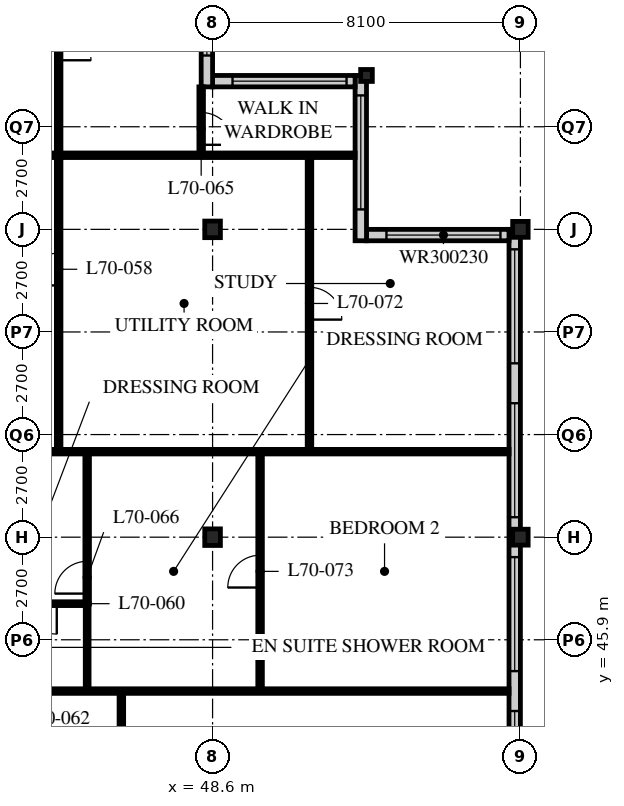
"""IFC4 building model, lengths in metres.
Left out: names, types, materials, properties, quantities, classifications, styles, units other than length and angle.
Written with IfcOpenShell. Run it as: python <this file> out.ifc"""

import sys

from ifc_helpers import new_model, si_unit, direction, frame, frame_2d, origin, origin_2d, place, context, subcontext, project, spatial, rectangle, i_section, extrude, element, fill, save


model = new_model("IFC4")
c1 = context("Model", 3, precision=1e-05, world=origin(), true_north=direction((0.0, 1.0)))
c2 = subcontext(c1, "Body", "Model", "MODEL_VIEW")
j1 = project(units=[si_unit("LENGTHUNIT", "METRE"), si_unit("PLANEANGLEUNIT", "RADIAN")], contexts=[c1])
p1 = place(None, origin())
s1 = spatial("IfcSite", under=j1, at=p1, CompositionType="ELEMENT")
p2 = place(p1, origin())
s2 = spatial("IfcBuilding", under=s1, at=p2, CompositionType="ELEMENT")
p3 = place(p2, frame((0.0, 0.0, 273.6)))
s3 = spatial("IfcBuildingStorey", under=s2, at=p3, CompositionType="ELEMENT", Elevation=273.6)
for number, where, z_axis, x_axis in (
    (1, (48.6, 48.6, 0.0), (0.0, 0.0, 1.0), (1.0, 0.0, 0.0)),
    (2, (48.6, 56.7, 0.0), (0.0, 0.0, 1.0), (1.0, 0.0, 0.0)),
):
    element("IfcColumn", number, at=place(p3, frame(where, z_axis=z_axis, x_axis=x_axis)), inside=s3, PredefinedType="COLUMN", context=c2, shape_type="SweptSolid", body=[
        extrude(i_section(OverallWidth=0.412, OverallDepth=0.437, WebThickness=0.036, FlangeThickness=0.058, FilletRadius=0.015, at=origin_2d()), origin(), (0.0, 0.0, 1.0), 3.9),
    ])
p4 = place(p3, frame((52.65, 60.75, 0.0), z_axis=(0.0, 0.0, 1.0), x_axis=(1.0, 0.0, 0.0)))
e3 = element("IfcColumn", 3, at=p4, inside=s3, PredefinedType="COLUMN", context=c2, shape_type="SweptSolid", body=[
    extrude(i_section(OverallWidth=0.307, OverallDepth=0.314, WebThickness=0.012, FlangeThickness=0.019, FilletRadius=0.015, at=origin_2d()), origin(), (0.0, 0.0, 1.0), 3.9),
])
for number, where, z_axis, x_axis in (
    (4, (56.7, 48.6, 0.0), (0.0, 0.0, 1.0), (1.0, 0.0, 0.0)),
    (5, (56.7, 56.7, 0.0), (0.0, 0.0, 1.0), (1.0, 0.0, 0.0)),
):
    element("IfcColumn", number, at=place(p3, frame(where, z_axis=z_axis, x_axis=x_axis)), inside=s3, PredefinedType="COLUMN", context=c2, shape_type="SweptSolid", body=[
        extrude(i_section(OverallWidth=0.407, OverallDepth=0.419, WebThickness=0.031, FlangeThickness=0.049, FilletRadius=0.015, at=origin_2d()), origin(), (0.0, 0.0, 1.0), 3.9),
    ])
p5 = place(p3, frame((56.55, 24.6, 0.0), z_axis=(0.0, 0.0, 1.0), x_axis=(0.0, 1.0, 0.0)))
e6 = element("IfcWall", 6, at=p5, inside=s3, PredefinedType="SOLIDWALL", context=c2, shape_type="SweptSolid", body=[
    extrude(rectangle(XDim=32.1, YDim=0.3, at=frame_2d((16.05, 0.0))), origin(), (0.0, 0.0, 1.0), 3.69),
])
p6 = place(p5, frame((0.225, 0.0, 0.6)))
e7 = element("IfcOpeningElement", 7, at=p6, cuts=e6, PredefinedType="OPENING", context=c2, shape_type="SweptSolid", body=[
    extrude(rectangle(XDim=3.0, YDim=2.4, at=frame_2d((1.5, 1.2))), frame((0.0, 0.16, 0.0), z_axis=(0.0, -1.0, 0.0), x_axis=(1.0, 0.0, 0.0)), (0.0, 0.0, 1.0), 0.32),
])
p7 = place(p5, frame((4.275, 0.0, 0.6)))
e8 = element("IfcOpeningElement", 8, at=p7, cuts=e6, PredefinedType="OPENING", context=c2, shape_type="SweptSolid", body=[
    extrude(rectangle(XDim=3.0, YDim=2.4, at=frame_2d((1.5, 1.2))), frame((0.0, 0.16, 0.0), z_axis=(0.0, -1.0, 0.0), x_axis=(1.0, 0.0, 0.0)), (0.0, 0.0, 1.0), 0.32),
])
p8 = place(p5, frame((8.325, 0.0, 0.6)))
e9 = element("IfcOpeningElement", 9, at=p8, cuts=e6, PredefinedType="OPENING", context=c2, shape_type="SweptSolid", body=[
    extrude(rectangle(XDim=3.0, YDim=2.4, at=frame_2d((1.5, 1.2))), frame((0.0, 0.16, 0.0), z_axis=(0.0, -1.0, 0.0), x_axis=(1.0, 0.0, 0.0)), (0.0, 0.0, 1.0), 0.32),
])
p9 = place(p5, frame((12.375, 0.0, 0.6)))
e10 = element("IfcOpeningElement", 10, at=p9, cuts=e6, PredefinedType="OPENING", context=c2, shape_type="SweptSolid", body=[
    extrude(rectangle(XDim=3.0, YDim=2.4, at=frame_2d((1.5, 1.2))), frame((0.0, 0.16, 0.0), z_axis=(0.0, -1.0, 0.0), x_axis=(1.0, 0.0, 0.0)), (0.0, 0.0, 1.0), 0.32),
])
p10 = place(p5, frame((16.425, 0.0, 0.6)))
e11 = element("IfcOpeningElement", 11, at=p10, cuts=e6, PredefinedType="OPENING", context=c2, shape_type="SweptSolid", body=[
    extrude(rectangle(XDim=3.0, YDim=2.4, at=frame_2d((1.5, 1.2))), frame((0.0, 0.16, 0.0), z_axis=(0.0, -1.0, 0.0), x_axis=(1.0, 0.0, 0.0)), (0.0, 0.0, 1.0), 0.32),
])
p11 = place(p5, frame((20.475, 0.0, 0.6)))
e12 = element("IfcOpeningElement", 12, at=p11, cuts=e6, PredefinedType="OPENING", context=c2, shape_type="SweptSolid", body=[
    extrude(rectangle(XDim=3.0, YDim=2.4, at=frame_2d((1.5, 1.2))), frame((0.0, 0.16, 0.0), z_axis=(0.0, -1.0, 0.0), x_axis=(1.0, 0.0, 0.0)), (0.0, 0.0, 1.0), 0.32),
])
p12 = place(p5, frame((24.525, 0.0, 0.6)))
e13 = element("IfcOpeningElement", 13, at=p12, cuts=e6, PredefinedType="OPENING", context=c2, shape_type="SweptSolid", body=[
    extrude(rectangle(XDim=3.0, YDim=2.4, at=frame_2d((1.5, 1.2))), frame((0.0, 0.16, 0.0), z_axis=(0.0, -1.0, 0.0), x_axis=(1.0, 0.0, 0.0)), (0.0, 0.0, 1.0), 0.32),
])
p13 = place(p5, frame((28.575, 0.0, 0.6)))
e14 = element("IfcOpeningElement", 14, at=p13, cuts=e6, PredefinedType="OPENING", context=c2, shape_type="SweptSolid", body=[
    extrude(rectangle(XDim=3.0, YDim=2.4, at=frame_2d((1.5, 1.2))), frame((0.0, 0.16, 0.0), z_axis=(0.0, -1.0, 0.0), x_axis=(1.0, 0.0, 0.0)), (0.0, 0.0, 1.0), 0.32),
])
p14 = place(p3, frame((56.4, 56.55, 0.0), z_axis=(0.0, 0.0, 1.0), x_axis=(-1.0, 0.0, 0.0)))
e15 = element("IfcWall", 15, at=p14, inside=s3, PredefinedType="SOLIDWALL", context=c2, shape_type="SweptSolid", body=[
    extrude(rectangle(XDim=3.75, YDim=0.3, at=frame_2d((1.875, 0.0))), origin(), (0.0, 0.0, 1.0), 3.69),
])
p15 = place(p14, frame((0.225, 0.0, 0.6)))
e16 = element("IfcOpeningElement", 16, at=p15, cuts=e15, PredefinedType="OPENING", context=c2, shape_type="SweptSolid", body=[
    extrude(rectangle(XDim=3.0, YDim=2.3, at=frame_2d((1.5, 1.15))), frame((0.0, 0.16, 0.0), z_axis=(0.0, -1.0, 0.0), x_axis=(1.0, 0.0, 0.0)), (0.0, 0.0, 1.0), 0.32),
])
p16 = place(p3, frame((52.5, 56.4, 0.0), z_axis=(0.0, 0.0, 1.0), x_axis=(0.0, 1.0, 0.0)))
e17 = element("IfcWall", 17, at=p16, inside=s3, PredefinedType="SOLIDWALL", context=c2, shape_type="SweptSolid", body=[
    extrude(rectangle(XDim=4.35, YDim=0.3, at=frame_2d((2.175, 0.0))), origin(), (0.0, 0.0, 1.0), 3.69),
])
p17 = place(p16, frame((0.825, 0.0, 0.6)))
e18 = element("IfcOpeningElement", 18, at=p17, cuts=e17, PredefinedType="OPENING", context=c2, shape_type="SweptSolid", body=[
    extrude(rectangle(XDim=3.0, YDim=2.3, at=frame_2d((1.5, 1.15))), frame((0.0, 0.16, 0.0), z_axis=(0.0, -1.0, 0.0), x_axis=(1.0, 0.0, 0.0)), (0.0, 0.0, 1.0), 0.32),
])
p18 = place(p3, frame((52.35, 60.6, 0.0), z_axis=(0.0, 0.0, 1.0), x_axis=(-1.0, 0.0, 0.0)))
e19 = element("IfcWall", 19, at=p18, inside=s3, PredefinedType="SOLIDWALL", context=c2, shape_type="SweptSolid", body=[
    extrude(rectangle(XDim=3.75, YDim=0.3, at=frame_2d((1.875, 0.0))), origin(), (0.0, 0.0, 1.0), 3.69),
])
p19 = place(p18, frame((0.225, 0.0, 0.6)))
e20 = element("IfcOpeningElement", 20, at=p19, cuts=e19, PredefinedType="OPENING", context=c2, shape_type="SweptSolid", body=[
    extrude(rectangle(XDim=3.0, YDim=2.3, at=frame_2d((1.5, 1.15))), frame((0.0, 0.16, 0.0), z_axis=(0.0, -1.0, 0.0), x_axis=(1.0, 0.0, 0.0)), (0.0, 0.0, 1.0), 0.32),
])
p20 = place(p3, frame((48.45, 60.45, 0.0), z_axis=(0.0, 0.0, 1.0), x_axis=(0.0, 1.0, 0.0)))
e21 = element("IfcWall", 21, at=p20, inside=s3, PredefinedType="SOLIDWALL", context=c2, shape_type="SweptSolid", body=[
    extrude(rectangle(XDim=4.35, YDim=0.3, at=frame_2d((2.175, 0.0))), origin(), (0.0, 0.0, 1.0), 3.69),
])
p21 = place(p20, frame((0.825, 0.0, 0.6)))
e22 = element("IfcOpeningElement", 22, at=p21, cuts=e21, PredefinedType="OPENING", context=c2, shape_type="SweptSolid", body=[
    extrude(rectangle(XDim=3.0, YDim=2.3, at=frame_2d((1.5, 1.15))), frame((0.0, 0.16, 0.0), z_axis=(0.0, -1.0, 0.0), x_axis=(1.0, 0.0, 0.0)), (0.0, 0.0, 1.0), 0.32),
])
p22 = place(p3, frame((42.9, 50.85, 0.0), z_axis=(0.0, 0.0, 1.0), x_axis=(1.0, 0.0, 0.0)))
e23 = element("IfcWall", 23, at=p22, inside=s3, PredefinedType="PARTITIONING", context=c2, shape_type="SweptSolid", body=[
    extrude(rectangle(XDim=13.5, YDim=0.12, at=frame_2d((6.75, 0.0))), origin(), (0.0, 0.0, 1.0), 3.69),
])
p23 = place(p3, frame((36.45, 58.65, 0.0), z_axis=(0.0, 0.0, 1.0), x_axis=(1.0, 0.0, 0.0)))
e24 = element("IfcWall", 24, at=p23, inside=s3, PredefinedType="PARTITIONING", context=c2, shape_type="SweptSolid", body=[
    extrude(rectangle(XDim=15.9, YDim=0.12, at=frame_2d((7.95, 0.0))), origin(), (0.0, 0.0, 1.0), 3.69),
])
p24 = place(p23, frame((1.675, 0.0, 0.0)))
e25 = element("IfcOpeningElement", 25, at=p24, cuts=e24, PredefinedType="OPENING", context=c2, shape_type="SweptSolid", body=[
    extrude(rectangle(XDim=0.85, YDim=2.1, at=frame_2d((0.425, 1.05))), frame((0.0, 0.07, 0.0), z_axis=(0.0, -1.0, 0.0), x_axis=(1.0, 0.0, 0.0)), (0.0, 0.0, 1.0), 0.14),
])
p25 = place(p3, frame((44.55, 64.5, 0.0), z_axis=(0.0, 0.0, 1.0), x_axis=(0.0, -1.0, 0.0)))
e26 = element("IfcWall", 26, at=p25, inside=s3, PredefinedType="PARTITIONING", context=c2, shape_type="SweptSolid", body=[
    extrude(rectangle(XDim=13.65, YDim=0.12, at=frame_2d((6.825, 0.0))), origin(), (0.0, 0.0, 1.0), 3.69),
])
p26 = place(p25, frame((8.425, 0.0, 0.0)))
e27 = element("IfcOpeningElement", 27, at=p26, cuts=e26, PredefinedType="OPENING", context=c2, shape_type="SweptSolid", body=[
    extrude(rectangle(XDim=0.85, YDim=2.1, at=frame_2d((0.425, 1.05))), frame((0.0, 0.07, 0.0), z_axis=(0.0, -1.0, 0.0), x_axis=(1.0, 0.0, 0.0)), (0.0, 0.0, 1.0), 0.14),
])
p27 = place(p25, frame((2.5, 0.0, 0.0)))
e28 = element("IfcOpeningElement", 28, at=p27, cuts=e26, PredefinedType="OPENING", context=c2, shape_type="SweptSolid", body=[
    extrude(rectangle(XDim=0.85, YDim=2.1, at=frame_2d((0.425, 1.05))), frame((0.0, 0.07, 0.0), z_axis=(0.0, -1.0, 0.0), x_axis=(1.0, 0.0, 0.0)), (0.0, 0.0, 1.0), 0.14),
])
p28 = place(p3, frame((42.9, 46.85, 0.0), z_axis=(0.0, 0.0, 1.0), x_axis=(1.0, 0.0, 0.0)))
e29 = element("IfcWall", 29, at=p28, inside=s3, PredefinedType="PARTITIONING", context=c2, shape_type="SweptSolid", body=[
    extrude(rectangle(XDim=2.4, YDim=0.1, at=frame_2d((1.2, 0.0))), origin(), (0.0, 0.0, 1.0), 3.69),
])
p29 = place(p28, frame((0.8, 0.0, 0.0)))
e30 = element("IfcOpeningElement", 30, at=p29, cuts=e29, PredefinedType="OPENING", context=c2, shape_type="SweptSolid", body=[
    extrude(rectangle(XDim=0.8, YDim=2.1, at=frame_2d((0.4, 1.05))), frame((0.0, 0.06, 0.0), z_axis=(0.0, -1.0, 0.0), x_axis=(1.0, 0.0, 0.0)), (0.0, 0.0, 1.0), 0.12),
])
p30 = place(p3, frame((45.3, 46.85, 0.0), z_axis=(0.0, 0.0, 1.0), x_axis=(0.0, -1.0, 0.0)))
e31 = element("IfcWall", 31, at=p30, inside=s3, PredefinedType="PARTITIONING", context=c2, shape_type="SweptSolid", body=[
    extrude(rectangle(XDim=2.3, YDim=0.1, at=frame_2d((1.15, 0.0))), origin(), (0.0, 0.0, 1.0), 3.69),
])
p31 = place(p3, frame((42.9, 44.55, 0.0), z_axis=(0.0, 0.0, 1.0), x_axis=(1.0, 0.0, 0.0)))
e32 = element("IfcWall", 32, at=p31, inside=s3, PredefinedType="PARTITIONING", context=c2, shape_type="SweptSolid", body=[
    extrude(rectangle(XDim=13.5, YDim=0.12, at=frame_2d((6.75, 0.0))), origin(), (0.0, 0.0, 1.0), 3.69),
])
p32 = place(p3, frame((48.3, 58.65, 0.0), z_axis=(0.0, 0.0, 1.0), x_axis=(0.0, 1.0, 0.0)))
e33 = element("IfcWall", 33, at=p32, inside=s3, PredefinedType="PARTITIONING", context=c2, shape_type="SweptSolid", body=[
    extrude(rectangle(XDim=1.8, YDim=0.12, at=frame_2d((0.9, 0.0))), origin(), (0.0, 0.0, 1.0), 3.69),
])
p33 = place(p32, frame((0.275, 0.0, 0.0)))
e34 = element("IfcOpeningElement", 34, at=p33, cuts=e33, PredefinedType="OPENING", context=c2, shape_type="SweptSolid", body=[
    extrude(rectangle(XDim=0.85, YDim=2.1, at=frame_2d((0.425, 1.05))), frame((0.0, 0.07, 0.0), z_axis=(0.0, -1.0, 0.0), x_axis=(1.0, 0.0, 0.0)), (0.0, 0.0, 1.0), 0.14),
])
p34 = place(p3, frame((45.3, 50.85, 0.0), z_axis=(0.0, 0.0, 1.0), x_axis=(0.0, -1.0, 0.0)))
e35 = element("IfcWall", 35, at=p34, inside=s3, PredefinedType="PARTITIONING", context=c2, shape_type="SweptSolid", body=[
    extrude(rectangle(XDim=4.01, YDim=0.12, at=frame_2d((2.005, 0.0))), origin(), (0.0, 0.0, 1.0), 3.69),
])
p35 = place(p34, frame((2.885, 0.0, 0.0)))
e36 = element("IfcOpeningElement", 36, at=p35, cuts=e35, PredefinedType="OPENING", context=c2, shape_type="SweptSolid", body=[
    extrude(rectangle(XDim=0.85, YDim=2.1, at=frame_2d((0.425, 1.05))), frame((0.0, 0.07, 0.0), z_axis=(0.0, -1.0, 0.0), x_axis=(1.0, 0.0, 0.0)), (0.0, 0.0, 1.0), 0.14),
])
p36 = place(p3, frame((46.2, 28.35, 0.0), z_axis=(0.0, 0.0, 1.0), x_axis=(0.0, 1.0, 0.0)))
e37 = element("IfcWall", 37, at=p36, inside=s3, PredefinedType="PARTITIONING", context=c2, shape_type="SweptSolid", body=[
    extrude(rectangle(XDim=16.2, YDim=0.12, at=frame_2d((8.1, 0.0))), origin(), (0.0, 0.0, 1.0), 3.69),
])
p37 = place(p36, frame((1.6, 0.0, 0.0)))
e38 = element("IfcOpeningElement", 38, at=p37, cuts=e37, PredefinedType="OPENING", context=c2, shape_type="SweptSolid", body=[
    extrude(rectangle(XDim=0.85, YDim=2.1, at=frame_2d((0.425, 1.05))), frame((0.0, 0.07, 0.0), z_axis=(0.0, -1.0, 0.0), x_axis=(1.0, 0.0, 0.0)), (0.0, 0.0, 1.0), 0.14),
])
p38 = place(p36, frame((5.65, 0.0, 0.0)))
e39 = element("IfcOpeningElement", 39, at=p38, cuts=e37, PredefinedType="OPENING", context=c2, shape_type="SweptSolid", body=[
    extrude(rectangle(XDim=0.85, YDim=2.1, at=frame_2d((0.425, 1.05))), frame((0.0, 0.07, 0.0), z_axis=(0.0, -1.0, 0.0), x_axis=(1.0, 0.0, 0.0)), (0.0, 0.0, 1.0), 0.14),
])
p39 = place(p36, frame((9.7, 0.0, 0.0)))
e40 = element("IfcOpeningElement", 40, at=p39, cuts=e37, PredefinedType="OPENING", context=c2, shape_type="SweptSolid", body=[
    extrude(rectangle(XDim=0.85, YDim=2.1, at=frame_2d((0.425, 1.05))), frame((0.0, 0.07, 0.0), z_axis=(0.0, -1.0, 0.0), x_axis=(1.0, 0.0, 0.0)), (0.0, 0.0, 1.0), 0.14),
])
p40 = place(p36, frame((13.75, 0.0, 0.0)))
e41 = element("IfcOpeningElement", 41, at=p40, cuts=e37, PredefinedType="OPENING", context=c2, shape_type="SweptSolid", body=[
    extrude(rectangle(XDim=0.85, YDim=2.1, at=frame_2d((0.425, 1.05))), frame((0.0, 0.07, 0.0), z_axis=(0.0, -1.0, 0.0), x_axis=(1.0, 0.0, 0.0)), (0.0, 0.0, 1.0), 0.14),
])
p41 = place(p3, frame((51.15, 50.85, 0.0), z_axis=(0.0, 0.0, 1.0), x_axis=(0.0, 1.0, 0.0)))
e42 = element("IfcWall", 42, at=p41, inside=s3, PredefinedType="PARTITIONING", context=c2, shape_type="SweptSolid", body=[
    extrude(rectangle(XDim=7.8, YDim=0.12, at=frame_2d((3.9, 0.0))), origin(), (0.0, 0.0, 1.0), 3.69),
])
p42 = place(p41, frame((3.475, 0.0, 0.0)))
e43 = element("IfcOpeningElement", 43, at=p42, cuts=e42, PredefinedType="OPENING", context=c2, shape_type="SweptSolid", body=[
    extrude(rectangle(XDim=0.85, YDim=2.1, at=frame_2d((0.425, 1.05))), frame((0.0, 0.07, 0.0), z_axis=(0.0, -1.0, 0.0), x_axis=(1.0, 0.0, 0.0)), (0.0, 0.0, 1.0), 0.14),
])
p43 = place(p3, frame((49.85, 44.55, 0.0), z_axis=(0.0, 0.0, 1.0), x_axis=(0.0, 1.0, 0.0)))
e44 = element("IfcWall", 44, at=p43, inside=s3, PredefinedType="PARTITIONING", context=c2, shape_type="SweptSolid", body=[
    extrude(rectangle(XDim=6.3, YDim=0.12, at=frame_2d((3.15, 0.0))), origin(), (0.0, 0.0, 1.0), 3.69),
])
p44 = place(p43, frame((2.725, 0.0, 0.0)))
e45 = element("IfcOpeningElement", 45, at=p44, cuts=e44, PredefinedType="OPENING", context=c2, shape_type="SweptSolid", body=[
    extrude(rectangle(XDim=0.85, YDim=2.1, at=frame_2d((0.425, 1.05))), frame((0.0, 0.07, 0.0), z_axis=(0.0, -1.0, 0.0), x_axis=(1.0, 0.0, 0.0)), (0.0, 0.0, 1.0), 0.14),
])
p45 = place(p10, origin())
e46 = element("IfcWindow", 46, at=p45, inside=s3, PartitioningType="SINGLE_PANEL", PredefinedType="WINDOW", context=c2, shape_type="SweptSolid", body=[
    extrude(rectangle(XDim=3.0, YDim=2.4, at=frame_2d((1.5, 1.2))), frame((0.0, 0.03, 0.0), z_axis=(0.0, -1.0, 0.0), x_axis=(1.0, 0.0, 0.0)), (0.0, 0.0, 1.0), 0.06),
])
fill(e11, e46)
p46 = place(p11, origin())
e47 = element("IfcWindow", 47, at=p46, inside=s3, PartitioningType="SINGLE_PANEL", PredefinedType="WINDOW", context=c2, shape_type="SweptSolid", body=[
    extrude(rectangle(XDim=3.0, YDim=2.4, at=frame_2d((1.5, 1.2))), frame((0.0, 0.03, 0.0), z_axis=(0.0, -1.0, 0.0), x_axis=(1.0, 0.0, 0.0)), (0.0, 0.0, 1.0), 0.06),
])
fill(e12, e47)
p47 = place(p12, origin())
e48 = element("IfcWindow", 48, at=p47, inside=s3, PartitioningType="SINGLE_PANEL", PredefinedType="WINDOW", context=c2, shape_type="SweptSolid", body=[
    extrude(rectangle(XDim=3.0, YDim=2.4, at=frame_2d((1.5, 1.2))), frame((0.0, 0.03, 0.0), z_axis=(0.0, -1.0, 0.0), x_axis=(1.0, 0.0, 0.0)), (0.0, 0.0, 1.0), 0.06),
])
fill(e13, e48)
p48 = place(p13, origin())
e49 = element("IfcWindow", 49, at=p48, inside=s3, PartitioningType="SINGLE_PANEL", PredefinedType="WINDOW", context=c2, shape_type="SweptSolid", body=[
    extrude(rectangle(XDim=3.0, YDim=2.4, at=frame_2d((1.5, 1.2))), frame((0.0, 0.03, 0.0), z_axis=(0.0, -1.0, 0.0), x_axis=(1.0, 0.0, 0.0)), (0.0, 0.0, 1.0), 0.06),
])
fill(e14, e49)
p49 = place(p15, origin())
e50 = element("IfcWindow", 50, at=p49, inside=s3, PartitioningType="SINGLE_PANEL", PredefinedType="WINDOW", context=c2, shape_type="SweptSolid", body=[
    extrude(rectangle(XDim=3.0, YDim=2.3, at=frame_2d((1.5, 1.15))), frame((0.0, 0.03, 0.0), z_axis=(0.0, -1.0, 0.0), x_axis=(1.0, 0.0, 0.0)), (0.0, 0.0, 1.0), 0.06),
])
fill(e16, e50)
p50 = place(p17, origin())
e51 = element("IfcWindow", 51, at=p50, inside=s3, PartitioningType="SINGLE_PANEL", PredefinedType="WINDOW", context=c2, shape_type="SweptSolid", body=[
    extrude(rectangle(XDim=3.0, YDim=2.3, at=frame_2d((1.5, 1.15))), frame((0.0, 0.03, 0.0), z_axis=(0.0, -1.0, 0.0), x_axis=(1.0, 0.0, 0.0)), (0.0, 0.0, 1.0), 0.06),
])
fill(e18, e51)
p51 = place(p19, origin())
e52 = element("IfcWindow", 52, at=p51, inside=s3, PartitioningType="SINGLE_PANEL", PredefinedType="WINDOW", context=c2, shape_type="SweptSolid", body=[
    extrude(rectangle(XDim=3.0, YDim=2.3, at=frame_2d((1.5, 1.15))), frame((0.0, 0.03, 0.0), z_axis=(0.0, -1.0, 0.0), x_axis=(1.0, 0.0, 0.0)), (0.0, 0.0, 1.0), 0.06),
])
fill(e20, e52)
p52 = place(p21, origin())
e53 = element("IfcWindow", 53, at=p52, inside=s3, PartitioningType="SINGLE_PANEL", PredefinedType="WINDOW", context=c2, shape_type="SweptSolid", body=[
    extrude(rectangle(XDim=3.0, YDim=2.3, at=frame_2d((1.5, 1.15))), frame((0.0, 0.03, 0.0), z_axis=(0.0, -1.0, 0.0), x_axis=(1.0, 0.0, 0.0)), (0.0, 0.0, 1.0), 0.06),
])
fill(e22, e53)
p53 = place(p26, origin())
e54 = element("IfcDoor", 54, at=p53, inside=s3, OperationType="SINGLE_SWING_LEFT", PredefinedType="DOOR", context=c2, shape_type="SweptSolid", body=[
    extrude(rectangle(XDim=0.85, YDim=2.1, at=frame_2d((0.425, 1.05))), frame((0.0, 0.025, 0.0), z_axis=(0.0, -1.0, 0.0), x_axis=(1.0, 0.0, 0.0)), (0.0, 0.0, 1.0), 0.05),
])
fill(e27, e54)
p54 = place(p27, origin())
e55 = element("IfcDoor", 55, at=p54, inside=s3, OperationType="SINGLE_SWING_RIGHT", PredefinedType="DOOR", context=c2, shape_type="SweptSolid", body=[
    extrude(rectangle(XDim=0.85, YDim=2.1, at=frame_2d((0.425, 1.05))), frame((0.0, 0.025, 0.0), z_axis=(0.0, -1.0, 0.0), x_axis=(1.0, 0.0, 0.0)), (0.0, 0.0, 1.0), 0.05),
])
fill(e28, e55)
p55 = place(p29, origin())
e56 = element("IfcDoor", 56, at=p55, inside=s3, OperationType="SINGLE_SWING_LEFT", PredefinedType="DOOR", context=c2, shape_type="SweptSolid", body=[
    extrude(rectangle(XDim=0.8, YDim=2.1, at=frame_2d((0.4, 1.05))), frame((0.0, 0.025, 0.0), z_axis=(0.0, -1.0, 0.0), x_axis=(1.0, 0.0, 0.0)), (0.0, 0.0, 1.0), 0.05),
])
fill(e30, e56)
p56 = place(p33, origin())
e57 = element("IfcDoor", 57, at=p56, inside=s3, OperationType="SINGLE_SWING_RIGHT", PredefinedType="DOOR", context=c2, shape_type="SweptSolid", body=[
    extrude(rectangle(XDim=0.85, YDim=2.1, at=frame_2d((0.425, 1.05))), frame((0.0, 0.025, 0.0), z_axis=(0.0, -1.0, 0.0), x_axis=(1.0, 0.0, 0.0)), (0.0, 0.0, 1.0), 0.05),
])
fill(e34, e57)
p57 = place(p35, origin())
e58 = element("IfcDoor", 58, at=p57, inside=s3, OperationType="SINGLE_SWING_LEFT", PredefinedType="DOOR", context=c2, shape_type="SweptSolid", body=[
    extrude(rectangle(XDim=0.85, YDim=2.1, at=frame_2d((0.425, 1.05))), frame((0.0, 0.025, 0.0), z_axis=(0.0, -1.0, 0.0), x_axis=(1.0, 0.0, 0.0)), (0.0, 0.0, 1.0), 0.05),
])
fill(e36, e58)
p58 = place(p42, origin())
e59 = element("IfcDoor", 59, at=p58, inside=s3, OperationType="SINGLE_SWING_RIGHT", PredefinedType="DOOR", context=c2, shape_type="SweptSolid", body=[
    extrude(rectangle(XDim=0.85, YDim=2.1, at=frame_2d((0.425, 1.05))), frame((0.0, 0.025, 0.0), z_axis=(0.0, -1.0, 0.0), x_axis=(1.0, 0.0, 0.0)), (0.0, 0.0, 1.0), 0.05),
])
fill(e43, e59)
p59 = place(p44, origin())
e60 = element("IfcDoor", 60, at=p59, inside=s3, OperationType="SINGLE_SWING_LEFT", PredefinedType="DOOR", context=c2, shape_type="SweptSolid", body=[
    extrude(rectangle(XDim=0.85, YDim=2.1, at=frame_2d((0.425, 1.05))), frame((0.0, 0.025, 0.0), z_axis=(0.0, -1.0, 0.0), x_axis=(1.0, 0.0, 0.0)), (0.0, 0.0, 1.0), 0.05),
])
fill(e45, e60)
save(model, sys.argv[1])
